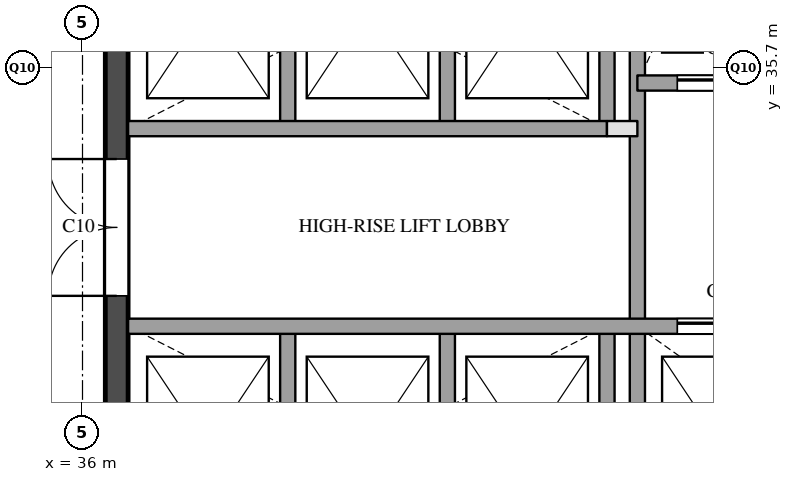
"""IFC4 building model, lengths in metres.
Left out: names, types, materials, properties, quantities, classifications, styles, units other than length and angle.
Written with IfcOpenShell. Run it as: python <this file> out.ifc"""

import sys

from ifc_helpers import new_model, si_unit, direction, frame, frame_2d, origin, place, context, subcontext, project, spatial, rectangle, extrude, element, fill, save


model = new_model("IFC4")
c1 = context("Model", 3, precision=1e-05, world=origin(), true_north=direction((0.0, 1.0)))
c2 = subcontext(c1, "Body", "Model", "MODEL_VIEW")
j1 = project(units=[si_unit("LENGTHUNIT", "METRE"), si_unit("PLANEANGLEUNIT", "RADIAN")], contexts=[c1])
p1 = place(None, origin())
s1 = spatial("IfcSite", under=j1, at=p1, CompositionType="ELEMENT")
p2 = place(p1, origin())
s2 = spatial("IfcBuilding", under=s1, at=p2, CompositionType="ELEMENT")
p3 = place(p2, frame((0.0, 0.0, 301.2)))
s3 = spatial("IfcBuildingStorey", under=s2, at=p3, CompositionType="ELEMENT", Elevation=301.2)
p4 = place(p3, frame((36.45, 29.1, 0.0), z_axis=(0.0, 0.0, 1.0), x_axis=(0.0, 1.0, 0.0)))
e1 = element("IfcWall", 1, at=p4, inside=s3, PredefinedType="SHEAR", context=c2, shape_type="SweptSolid", body=[
    extrude(rectangle(XDim=20.3, YDim=0.3, at=frame_2d((10.15, 0.0))), origin(), (0.0, 0.0, 1.0), 3.6),
])
p5 = place(p4, frame((3.6, 0.0, 0.0)))
e2 = element("IfcOpeningElement", 2, at=p5, cuts=e1, PredefinedType="OPENING", context=c2, shape_type="SweptSolid", body=[
    extrude(rectangle(XDim=1.8, YDim=2.1, at=frame_2d((0.9, 1.05))), frame((0.0, 0.16, 0.0), z_axis=(0.0, -1.0, 0.0), x_axis=(1.0, 0.0, 0.0)), (0.0, 0.0, 1.0), 0.32),
])
p6 = place(p4, frame((16.4, 0.0, 0.0)))
e3 = element("IfcOpeningElement", 3, at=p6, cuts=e1, PredefinedType="OPENING", context=c2, shape_type="SweptSolid", body=[
    extrude(rectangle(XDim=1.0, YDim=2.1, at=frame_2d((0.5, 1.05))), frame((0.0, 0.16, 0.0), z_axis=(0.0, -1.0, 0.0), x_axis=(1.0, 0.0, 0.0)), (0.0, 0.0, 1.0), 0.32),
])
p7 = place(p3, frame((38.7, 29.1, 0.0), z_axis=(0.0, 0.0, 1.0), x_axis=(0.0, 1.0, 0.0)))
e4 = element("IfcWall", 4, at=p7, inside=s3, PredefinedType="SOLIDWALL", context=c2, shape_type="SweptSolid", body=[
    extrude(rectangle(XDim=3.2, YDim=0.2, at=frame_2d((1.6, 0.0))), origin(), (0.0, 0.0, 1.0), 3.6),
])
p8 = place(p3, frame((38.7, 34.9, 0.0), z_axis=(0.0, 0.0, 1.0), x_axis=(0.0, 1.0, 0.0)))
e5 = element("IfcWall", 5, at=p8, inside=s3, PredefinedType="SOLIDWALL", context=c2, shape_type="SweptSolid", body=[
    extrude(rectangle(XDim=3.2, YDim=0.2, at=frame_2d((1.6, 0.0))), origin(), (0.0, 0.0, 1.0), 3.6),
])
p9 = place(p3, frame((40.8, 29.1, 0.0), z_axis=(0.0, 0.0, 1.0), x_axis=(0.0, 1.0, 0.0)))
e6 = element("IfcWall", 6, at=p9, inside=s3, PredefinedType="SOLIDWALL", context=c2, shape_type="SweptSolid", body=[
    extrude(rectangle(XDim=3.2, YDim=0.2, at=frame_2d((1.6, 0.0))), origin(), (0.0, 0.0, 1.0), 3.6),
])
p10 = place(p3, frame((40.8, 34.9, 0.0), z_axis=(0.0, 0.0, 1.0), x_axis=(0.0, 1.0, 0.0)))
e7 = element("IfcWall", 7, at=p10, inside=s3, PredefinedType="SOLIDWALL", context=c2, shape_type="SweptSolid", body=[
    extrude(rectangle(XDim=3.2, YDim=0.2, at=frame_2d((1.6, 0.0))), origin(), (0.0, 0.0, 1.0), 3.6),
])
p11 = place(p3, frame((42.9, 29.1, 0.0), z_axis=(0.0, 0.0, 1.0), x_axis=(0.0, 1.0, 0.0)))
e8 = element("IfcWall", 8, at=p11, inside=s3, PredefinedType="SOLIDWALL", context=c2, shape_type="SweptSolid", body=[
    extrude(rectangle(XDim=3.2, YDim=0.2, at=frame_2d((1.6, 0.0))), origin(), (0.0, 0.0, 1.0), 3.6),
])
p12 = place(p3, frame((42.9, 34.9, 0.0), z_axis=(0.0, 0.0, 1.0), x_axis=(0.0, 1.0, 0.0)))
e9 = element("IfcWall", 9, at=p12, inside=s3, PredefinedType="SOLIDWALL", context=c2, shape_type="SweptSolid", body=[
    extrude(rectangle(XDim=3.2, YDim=0.2, at=frame_2d((1.6, 0.0))), origin(), (0.0, 0.0, 1.0), 3.6),
])
p13 = place(p3, frame((43.3, 29.1, 0.0), z_axis=(0.0, 0.0, 1.0), x_axis=(0.0, 1.0, 0.0)))
e10 = element("IfcWall", 10, at=p13, inside=s3, PredefinedType="SOLIDWALL", context=c2, shape_type="SweptSolid", body=[
    extrude(rectangle(XDim=9.9, YDim=0.2, at=frame_2d((4.95, 0.0))), origin(), (0.0, 0.0, 1.0), 3.6),
])
p14 = place(p3, frame((36.6, 32.3, 0.0), z_axis=(0.0, 0.0, 1.0), x_axis=(1.0, 0.0, 0.0)))
e11 = element("IfcWall", 11, at=p14, inside=s3, PredefinedType="SOLIDWALL", context=c2, shape_type="SweptSolid", body=[
    extrude(rectangle(XDim=11.2, YDim=0.2, at=frame_2d((5.6, 0.0))), origin(), (0.0, 0.0, 1.0), 3.6),
])
p15 = place(p14, frame((7.225, 0.0, 0.0)))
e12 = element("IfcOpeningElement", 12, at=p15, cuts=e11, PredefinedType="OPENING", context=c2, shape_type="SweptSolid", body=[
    extrude(rectangle(XDim=1.2, YDim=2.1, at=frame_2d((0.6, 1.05))), frame((0.0, 0.11, 0.0), z_axis=(0.0, -1.0, 0.0), x_axis=(1.0, 0.0, 0.0)), (0.0, 0.0, 1.0), 0.22),
])
p16 = place(p14, frame((9.475, 0.0, 0.0)))
e13 = element("IfcOpeningElement", 13, at=p16, cuts=e11, PredefinedType="OPENING", context=c2, shape_type="SweptSolid", body=[
    extrude(rectangle(XDim=1.2, YDim=2.1, at=frame_2d((0.6, 1.05))), frame((0.0, 0.11, 0.0), z_axis=(0.0, -1.0, 0.0), x_axis=(1.0, 0.0, 0.0)), (0.0, 0.0, 1.0), 0.22),
])
p17 = place(p3, frame((42.9, 34.9, 0.0), z_axis=(0.0, 0.0, 1.0), x_axis=(1.0, 0.0, 0.0)))
e14 = element("IfcWall", 14, at=p17, inside=s3, PredefinedType="PARTITIONING", context=c2, shape_type="SweptSolid", body=[
    extrude(rectangle(XDim=0.4, YDim=0.2, at=frame_2d((0.2, 0.0))), origin(), (0.0, 0.0, 1.0), 3.6),
])
p18 = place(p3, frame((36.6, 34.9, 0.0), z_axis=(0.0, 0.0, 1.0), x_axis=(1.0, 0.0, 0.0)))
e15 = element("IfcWall", 15, at=p18, inside=s3, PredefinedType="SOLIDWALL", context=c2, shape_type="SweptSolid", body=[
    extrude(rectangle(XDim=6.3, YDim=0.2, at=frame_2d((3.15, 0.0))), origin(), (0.0, 0.0, 1.0), 3.6),
])
p19 = place(p3, frame((43.3, 35.5, 0.0), z_axis=(0.0, 0.0, 1.0), x_axis=(1.0, 0.0, 0.0)))
e16 = element("IfcWall", 16, at=p19, inside=s3, PredefinedType="SOLIDWALL", context=c2, shape_type="SweptSolid", body=[
    extrude(rectangle(XDim=4.5, YDim=0.2, at=frame_2d((2.25, 0.0))), origin(), (0.0, 0.0, 1.0), 3.6),
])
p20 = place(p19, frame((0.525, 0.0, 0.0)))
e17 = element("IfcOpeningElement", 17, at=p20, cuts=e16, PredefinedType="OPENING", context=c2, shape_type="SweptSolid", body=[
    extrude(rectangle(XDim=1.2, YDim=2.1, at=frame_2d((0.6, 1.05))), frame((0.0, 0.11, 0.0), z_axis=(0.0, -1.0, 0.0), x_axis=(1.0, 0.0, 0.0)), (0.0, 0.0, 1.0), 0.22),
])
p21 = place(p19, frame((3.025, 0.0, 0.0)))
e18 = element("IfcOpeningElement", 18, at=p21, cuts=e16, PredefinedType="OPENING", context=c2, shape_type="SweptSolid", body=[
    extrude(rectangle(XDim=0.7, YDim=2.1, at=frame_2d((0.35, 1.05))), frame((0.0, 0.11, 0.0), z_axis=(0.0, -1.0, 0.0), x_axis=(1.0, 0.0, 0.0)), (0.0, 0.0, 1.0), 0.22),
])
p22 = place(p15, origin())
e19 = element("IfcDoor", 19, at=p22, inside=s3, OperationType="SLIDING_TO_LEFT", PredefinedType="DOOR", context=c2, shape_type="SweptSolid", body=[
    extrude(rectangle(XDim=1.2, YDim=2.1, at=frame_2d((0.6, 1.05))), frame((0.0, 0.025, 0.0), z_axis=(0.0, -1.0, 0.0), x_axis=(1.0, 0.0, 0.0)), (0.0, 0.0, 1.0), 0.05),
])
fill(e12, e19)
p23 = place(p20, origin())
e20 = element("IfcDoor", 20, at=p23, inside=s3, OperationType="SLIDING_TO_LEFT", PredefinedType="DOOR", context=c2, shape_type="SweptSolid", body=[
    extrude(rectangle(XDim=1.2, YDim=2.1, at=frame_2d((0.6, 1.05))), frame((0.0, 0.025, 0.0), z_axis=(0.0, -1.0, 0.0), x_axis=(1.0, 0.0, 0.0)), (0.0, 0.0, 1.0), 0.05),
])
fill(e17, e20)
p24 = place(p5, origin())
e21 = element("IfcDoor", 21, at=p24, inside=s3, OperationType="DOUBLE_DOOR_SINGLE_SWING", PredefinedType="DOOR", context=c2, shape_type="SweptSolid", body=[
    extrude(rectangle(XDim=1.8, YDim=2.1, at=frame_2d((0.9, 1.05))), frame((0.0, 0.025, 0.0), z_axis=(0.0, -1.0, 0.0), x_axis=(1.0, 0.0, 0.0)), (0.0, 0.0, 1.0), 0.05),
])
fill(e2, e21)
save(model, sys.argv[1])
